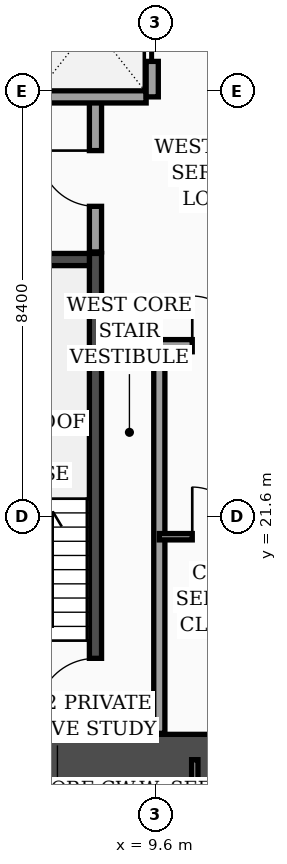
"""IFC4 building model, lengths in metres.
Left out: names, types, materials, properties, quantities, classifications, styles, units other than length and angle.
Written with IfcOpenShell. Run it as: python <this file> out.ifc"""

import sys

from ifc_helpers import new_model, si_unit, direction, frame, frame_2d, origin, place, context, subcontext, project, spatial, rectangle, extrude, element, fill, save


model = new_model("IFC4")
c1 = context("Model", 3, precision=1e-05, world=origin(), true_north=direction((0.0, 1.0)))
c2 = subcontext(c1, "Body", "Model", "MODEL_VIEW")
j1 = project(units=[si_unit("LENGTHUNIT", "METRE"), si_unit("PLANEANGLEUNIT", "RADIAN")], contexts=[c1])
p1 = place(None, origin())
s1 = spatial("IfcSite", under=j1, at=p1, CompositionType="ELEMENT")
p2 = place(p1, origin())
s2 = spatial("IfcBuilding", under=s1, at=p2, CompositionType="ELEMENT")
p3 = place(p2, frame((0.0, 0.0, 62.2)))
s3 = spatial("IfcBuildingStorey", under=s2, at=p3, CompositionType="ELEMENT", Elevation=62.2)
p4 = place(p3, frame((4.7, 16.8, 0.0), z_axis=(0.0, 0.0, 1.0), x_axis=(1.0, 0.0, 0.0)))
e1 = element("IfcWall", 1, at=p4, inside=s3, PredefinedType="SHEAR", context=c2, shape_type="SweptSolid", body=[
    extrude(rectangle(XDim=9.8, YDim=1.0, at=frame_2d((4.9, 0.0))), origin(), (0.0, 0.0, 1.0), 3.56),
])
p5 = place(p3, frame((8.42, 17.3, 0.0), z_axis=(0.0, 0.0, 1.0), x_axis=(0.0, 1.0, 0.0)))
e2 = element("IfcWall", 2, at=p5, inside=s3, PredefinedType="SOLIDWALL", context=c2, shape_type="SweptSolid", body=[
    extrude(rectangle(XDim=9.49, YDim=0.24, at=frame_2d((4.745, 0.0))), origin(), (0.0, 0.0, 1.0), 3.56),
])
p6 = place(p5, frame((0.35, 0.0, 0.0)))
e3 = element("IfcOpeningElement", 3, at=p6, cuts=e2, PredefinedType="OPENING", context=c2, shape_type="SweptSolid", body=[
    extrude(rectangle(XDim=1.15, YDim=2.2, at=frame_2d((0.575, 1.1))), frame((0.0, 0.13, 0.0), z_axis=(0.0, -1.0, 0.0), x_axis=(1.0, 0.0, 0.0)), (0.0, 0.0, 1.0), 0.26),
])
for number, where, z_axis, x_axis in (
    (4, (5.2, 17.58, 0.0), (0.0, 0.0, 1.0), (1.0, 0.0, 0.0)),
    (5, (5.2, 26.67, 0.0), (0.0, 0.0, 1.0), (1.0, 0.0, 0.0)),
):
    element("IfcWall", number, at=place(p3, frame(where, z_axis=z_axis, x_axis=x_axis)), inside=s3, PredefinedType="SOLIDWALL", context=c2, shape_type="SweptSolid", body=[
        extrude(rectangle(XDim=3.1, YDim=0.24, at=frame_2d((1.55, 0.0))), origin(), (0.0, 0.0, 1.0), 3.56),
    ])
p7 = place(p3, frame((8.42, 26.82, 0.0), z_axis=(0.0, 0.0, 1.0), x_axis=(0.0, 1.0, 0.0)))
e6 = element("IfcWall", 6, at=p7, inside=s3, PredefinedType="SOLIDWALL", context=c2, shape_type="SweptSolid", body=[
    extrude(rectangle(XDim=3.0, YDim=0.24, at=frame_2d((1.5, 0.0))), origin(), (0.0, 0.0, 1.0), 3.56),
])
p8 = place(p7, frame((0.9, 0.0, 0.0)))
e7 = element("IfcOpeningElement", 7, at=p8, cuts=e6, PredefinedType="OPENING", context=c2, shape_type="SweptSolid", body=[
    extrude(rectangle(XDim=1.1, YDim=2.2, at=frame_2d((0.55, 1.1))), frame((0.0, 0.13, 0.0), z_axis=(0.0, -1.0, 0.0), x_axis=(1.0, 0.0, 0.0)), (0.0, 0.0, 1.0), 0.26),
])
p9 = place(p3, frame((4.72, 29.88, 0.0), z_axis=(0.0, 0.0, 1.0), x_axis=(1.0, 0.0, 0.0)))
e8 = element("IfcWall", 8, at=p9, inside=s3, PredefinedType="SOLIDWALL", context=c2, shape_type="SweptSolid", body=[
    extrude(rectangle(XDim=4.7, YDim=0.24, at=frame_2d((2.35, 0.0))), origin(), (0.0, 0.0, 1.0), 3.56),
])
p10 = place(p9, frame((0.45, 0.0, 0.0)))
e9 = element("IfcOpeningElement", 9, at=p10, cuts=e8, PredefinedType="OPENING", context=c2, shape_type="SweptSolid", body=[
    extrude(rectangle(XDim=1.3, YDim=2.35, at=frame_2d((0.65, 1.175))), frame((0.0, 0.13, 0.0), z_axis=(0.0, -1.0, 0.0), x_axis=(1.0, 0.0, 0.0)), (0.0, 0.0, 1.0), 0.26),
])
p11 = place(p3, frame((9.54, 29.88, 0.0), z_axis=(0.0, 0.0, 1.0), x_axis=(0.0, 1.0, 0.0)))
e10 = element("IfcWall", 10, at=p11, inside=s3, PredefinedType="SOLIDWALL", context=c2, shape_type="SweptSolid", body=[
    extrude(rectangle(XDim=2.9, YDim=0.24, at=frame_2d((1.45, 0.0))), origin(), (0.0, 0.0, 1.0), 3.56),
])
p12 = place(p11, frame((0.7, 0.0, 0.0)))
e11 = element("IfcOpeningElement", 11, at=p12, cuts=e10, PredefinedType="OPENING", context=c2, shape_type="SweptSolid", body=[
    extrude(rectangle(XDim=1.3, YDim=2.35, at=frame_2d((0.65, 1.175))), frame((0.0, 0.13, 0.0), z_axis=(0.0, -1.0, 0.0), x_axis=(1.0, 0.0, 0.0)), (0.0, 0.0, 1.0), 0.26),
])
p13 = place(p3, frame((9.68, 17.32, 0.0), z_axis=(0.0, 0.0, 1.0), x_axis=(0.0, 1.0, 0.0)))
e12 = element("IfcWall", 12, at=p13, inside=s3, PredefinedType="SOLIDWALL", context=c2, shape_type="SweptSolid", body=[
    extrude(rectangle(XDim=7.68, YDim=0.22, at=frame_2d((3.84, 0.0))), origin(), (0.0, 0.0, 1.0), 3.56),
])
p14 = place(p3, frame((9.68, 21.2, 0.0), z_axis=(0.0, 0.0, 1.0), x_axis=(1.0, 0.0, 0.0)))
e13 = element("IfcWall", 13, at=p14, inside=s3, PredefinedType="PARTITIONING", context=c2, shape_type="SweptSolid", body=[
    extrude(rectangle(XDim=2.47, YDim=0.125, at=frame_2d((1.235, 0.0))), origin(), (0.0, 0.0, 1.0), 3.56),
])
p15 = place(p14, frame((0.65, 0.0, 0.0)))
e14 = element("IfcOpeningElement", 14, at=p15, cuts=e13, PredefinedType="OPENING", context=c2, shape_type="SweptSolid", body=[
    extrude(rectangle(XDim=0.98, YDim=2.15, at=frame_2d((0.49, 1.075))), frame((0.0, 0.073, 0.0), z_axis=(0.0, -1.0, 0.0), x_axis=(1.0, 0.0, 0.0)), (0.0, 0.0, 1.0), 0.145),
])
p16 = place(p3, frame((9.68, 24.97, 0.0), z_axis=(0.0, 0.0, 1.0), x_axis=(1.0, 0.0, 0.0)))
e15 = element("IfcWall", 15, at=p16, inside=s3, PredefinedType="SOLIDWALL", context=c2, shape_type="SweptSolid", body=[
    extrude(rectangle(XDim=2.47, YDim=0.24, at=frame_2d((1.235, 0.0))), origin(), (0.0, 0.0, 1.0), 3.56),
])
p17 = place(p16, frame((0.65, 0.0, 0.0)))
e16 = element("IfcOpeningElement", 16, at=p17, cuts=e15, PredefinedType="OPENING", context=c2, shape_type="SweptSolid", body=[
    extrude(rectangle(XDim=0.98, YDim=2.15, at=frame_2d((0.49, 1.075))), frame((0.0, 0.13, 0.0), z_axis=(0.0, -1.0, 0.0), x_axis=(1.0, 0.0, 0.0)), (0.0, 0.0, 1.0), 0.26),
])
p18 = place(p3, frame((10.38, 14.75, 0.0), z_axis=(0.0, 0.0, 1.0), x_axis=(0.0, 1.0, 0.0)))
e17 = element("IfcWall", 17, at=p18, inside=s3, PredefinedType="PARTITIONING", context=c2, shape_type="SweptSolid", body=[
    extrude(rectangle(XDim=2.05, YDim=0.125, at=frame_2d((1.025, 0.0))), origin(), (0.0, 0.0, 1.0), 3.56),
])
p19 = place(p8, origin())
e18 = element("IfcDoor", 18, at=p19, inside=s3, OperationType="SINGLE_SWING_RIGHT", PredefinedType="DOOR", context=c2, shape_type="SweptSolid", body=[
    extrude(rectangle(XDim=1.1, YDim=2.2, at=frame_2d((0.55, 1.1))), frame((0.0, 0.025, 0.0), z_axis=(0.0, -1.0, 0.0), x_axis=(1.0, 0.0, 0.0)), (0.0, 0.0, 1.0), 0.05),
])
fill(e7, e18)
p20 = place(p12, origin())
e19 = element("IfcDoor", 19, at=p20, inside=s3, OperationType="DOUBLE_DOOR_SLIDING", PredefinedType="DOOR", context=c2, shape_type="SweptSolid", body=[
    extrude(rectangle(XDim=1.3, YDim=2.35, at=frame_2d((0.65, 1.175))), frame((0.0, 0.025, 0.0), z_axis=(0.0, -1.0, 0.0), x_axis=(1.0, 0.0, 0.0)), (0.0, 0.0, 1.0), 0.05),
])
fill(e11, e19)
p21 = place(p15, origin())
e20 = element("IfcDoor", 20, at=p21, inside=s3, OperationType="SINGLE_SWING_LEFT", PredefinedType="DOOR", context=c2, shape_type="SweptSolid", body=[
    extrude(rectangle(XDim=0.98, YDim=2.15, at=frame_2d((0.49, 1.075))), frame((0.0, 0.025, 0.0), z_axis=(0.0, -1.0, 0.0), x_axis=(1.0, 0.0, 0.0)), (0.0, 0.0, 1.0), 0.05),
])
fill(e14, e20)
p22 = place(p17, origin())
e21 = element("IfcDoor", 21, at=p22, inside=s3, OperationType="SINGLE_SWING_LEFT", PredefinedType="DOOR", context=c2, shape_type="SweptSolid", body=[
    extrude(rectangle(XDim=0.98, YDim=2.15, at=frame_2d((0.49, 1.075))), frame((0.0, 0.025, 0.0), z_axis=(0.0, -1.0, 0.0), x_axis=(1.0, 0.0, 0.0)), (0.0, 0.0, 1.0), 0.05),
])
fill(e16, e21)
p23 = place(p6, origin())
e22 = element("IfcDoor", 22, at=p23, inside=s3, OperationType="SINGLE_SWING_LEFT", PredefinedType="DOOR", context=c2, shape_type="SweptSolid", body=[
    extrude(rectangle(XDim=1.15, YDim=2.2, at=frame_2d((0.575, 1.1))), frame((0.0, 0.025, 0.0), z_axis=(0.0, -1.0, 0.0), x_axis=(1.0, 0.0, 0.0)), (0.0, 0.0, 1.0), 0.05),
])
fill(e3, e22)
save(model, sys.argv[1])
